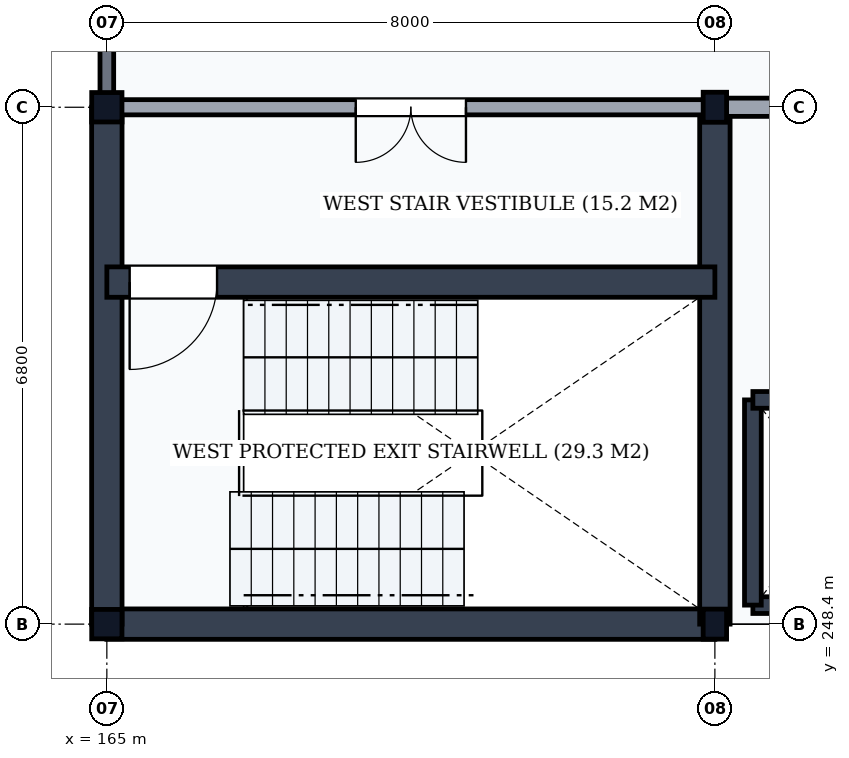
"""IFC4 building model, lengths in metres.
Left out: names, types, materials, properties, quantities, classifications, styles, units other than length and angle.
Written with IfcOpenShell. Run it as: python <this file> out.ifc"""

import sys

from ifc_helpers import new_model, si_unit, direction, frame, frame_2d, origin, origin_2d, place, context, subcontext, project, spatial, rectangle, i_section, extrude, element, fill, save


model = new_model("IFC4")
c1 = context("Model", 3, precision=1e-05, world=origin(), true_north=direction((0.0, 1.0)))
c2 = subcontext(c1, "Body", "Model", "MODEL_VIEW")
j1 = project(units=[si_unit("LENGTHUNIT", "METRE"), si_unit("PLANEANGLEUNIT", "RADIAN")], contexts=[c1])
p1 = place(None, origin())
s1 = spatial("IfcSite", under=j1, at=p1, CompositionType="ELEMENT")
p2 = place(p1, origin())
s2 = spatial("IfcBuilding", under=s1, at=p2, CompositionType="ELEMENT")
p3 = place(p2, frame((0.0, 0.0, 28.2)))
s3 = spatial("IfcBuildingStorey", under=s2, at=p3, CompositionType="ELEMENT", Elevation=28.2)
for number, where, z_axis, x_axis in (
    (1, (165.0, 248.4, 0.0), (0.0, 0.0, 1.0), (1.0, 0.0, 0.0)),
    (2, (165.0, 255.2, 0.0), (0.0, 0.0, 1.0), (1.0, 0.0, 0.0)),
):
    element("IfcColumn", number, at=place(p3, frame(where, z_axis=z_axis, x_axis=x_axis)), inside=s3, PredefinedType="COLUMN", context=c2, shape_type="SweptSolid", body=[
        extrude(i_section(OverallWidth=0.398, OverallDepth=0.387, WebThickness=0.021, FlangeThickness=0.033, FilletRadius=0.015, at=origin_2d()), origin(), (0.0, 0.0, 1.0), 3.9),
    ])
for number, where, z_axis, x_axis in (
    (3, (173.0, 248.4, 0.0), (0.0, 0.0, 1.0), (1.0, 0.0, 0.0)),
    (4, (173.0, 255.2, 0.0), (0.0, 0.0, 1.0), (1.0, 0.0, 0.0)),
):
    element("IfcColumn", number, at=place(p3, frame(where, z_axis=z_axis, x_axis=x_axis)), inside=s3, PredefinedType="COLUMN", context=c2, shape_type="SweptSolid", body=[
        extrude(i_section(OverallWidth=0.308, OverallDepth=0.395, WebThickness=0.021, FlangeThickness=0.04, FilletRadius=0.027, at=origin_2d()), origin(), (0.0, 0.0, 1.0), 3.9),
    ])
p4 = place(p3, frame((165.0, 255.206, 0.0), z_axis=(0.0, 0.0, 1.0), x_axis=(0.0, 1.0, 0.0)))
e5 = element("IfcWall", 5, at=p4, inside=s3, PredefinedType="SOLIDWALL", context=c2, shape_type="SweptSolid", body=[
    extrude(rectangle(XDim=7.588, YDim=0.18, at=frame_2d((3.794, 0.0))), origin(), (0.0, 0.0, 1.0), 3.388),
])
p5 = place(p3, frame((165.0, 248.4, 0.0), z_axis=(0.0, 0.0, 1.0), x_axis=(1.0, 0.0, 0.0)))
e6 = element("IfcWall", 6, at=p5, inside=s3, PredefinedType="SHEAR", context=c2, shape_type="SweptSolid", body=[
    extrude(rectangle(XDim=8.0, YDim=0.4, at=frame_2d((4.0, 0.0))), origin(), (0.0, 0.0, 1.0), 3.66),
])
for number, where, z_axis, x_axis in (
    (7, (165.0, 248.4, 0.0), (0.0, 0.0, 1.0), (0.0, 1.0, 0.0)),
    (8, (173.0, 248.4, 0.0), (0.0, 0.0, 1.0), (0.0, 1.0, 0.0)),
):
    element("IfcWall", number, at=place(p3, frame(where, z_axis=z_axis, x_axis=x_axis)), inside=s3, PredefinedType="SHEAR", context=c2, shape_type="SweptSolid", body=[
        extrude(rectangle(XDim=6.8, YDim=0.4, at=frame_2d((3.4, 0.0))), origin(), (0.0, 0.0, 1.0), 3.66),
    ])
p6 = place(p3, frame((165.0, 252.9, 0.0), z_axis=(0.0, 0.0, 1.0), x_axis=(1.0, 0.0, 0.0)))
e9 = element("IfcWall", 9, at=p6, inside=s3, PredefinedType="SHEAR", context=c2, shape_type="SweptSolid", body=[
    extrude(rectangle(XDim=8.0, YDim=0.4, at=frame_2d((4.0, 0.0))), origin(), (0.0, 0.0, 1.0), 3.66),
])
p7 = place(p6, frame((0.3, 0.0, 0.0)))
e10 = element("IfcOpeningElement", 10, at=p7, cuts=e9, PredefinedType="OPENING", context=c2, shape_type="SweptSolid", body=[
    extrude(rectangle(XDim=1.15, YDim=2.15, at=frame_2d((0.575, 1.075))), frame((0.0, 0.215, 0.0), z_axis=(0.0, -1.0, 0.0), x_axis=(1.0, 0.0, 0.0)), (0.0, 0.0, 1.0), 0.43),
])
p8 = place(p3, frame((165.0, 255.2, 0.0), z_axis=(0.0, 0.0, 1.0), x_axis=(1.0, 0.0, 0.0)))
e11 = element("IfcWall", 11, at=p8, inside=s3, PredefinedType="PARTITIONING", context=c2, shape_type="SweptSolid", body=[
    extrude(rectangle(XDim=8.0, YDim=0.2, at=frame_2d((4.0, 0.0))), origin(), (0.0, 0.0, 1.0), 3.058),
])
p9 = place(p8, frame((3.275, 0.0, 0.0)))
e12 = element("IfcOpeningElement", 12, at=p9, cuts=e11, PredefinedType="OPENING", context=c2, shape_type="SweptSolid", body=[
    extrude(rectangle(XDim=1.45, YDim=2.2, at=frame_2d((0.725, 1.1))), frame((0.0, 0.115, 0.0), z_axis=(0.0, -1.0, 0.0), x_axis=(1.0, 0.0, 0.0)), (0.0, 0.0, 1.0), 0.23),
])
p10 = place(p3, frame((173.5, 248.65, 0.0), z_axis=(0.0, 0.0, 1.0), x_axis=(1.0, 0.0, 0.0)))
e13 = element("IfcWall", 13, at=p10, inside=s3, PredefinedType="SHEAR", context=c2, shape_type="SweptSolid", body=[
    extrude(rectangle(XDim=2.2, YDim=0.22, at=frame_2d((1.1, 0.0))), origin(), (0.0, 0.0, 1.0), 3.66),
])
p11 = place(p3, frame((173.5, 248.65, 0.0), z_axis=(0.0, 0.0, 1.0), x_axis=(0.0, 1.0, 0.0)))
e14 = element("IfcWall", 14, at=p11, inside=s3, PredefinedType="SHEAR", context=c2, shape_type="SweptSolid", body=[
    extrude(rectangle(XDim=2.7, YDim=0.22, at=frame_2d((1.35, 0.0))), origin(), (0.0, 0.0, 1.0), 3.66),
])
p12 = place(p3, frame((173.5, 251.35, 0.0), z_axis=(0.0, 0.0, 1.0), x_axis=(1.0, 0.0, 0.0)))
e15 = element("IfcWall", 15, at=p12, inside=s3, PredefinedType="SHEAR", context=c2, shape_type="SweptSolid", body=[
    extrude(rectangle(XDim=2.2, YDim=0.22, at=frame_2d((1.1, 0.0))), origin(), (0.0, 0.0, 1.0), 3.66),
])
p13 = place(p12, frame((0.55, 0.0, 0.0)))
e16 = element("IfcOpeningElement", 16, at=p13, cuts=e15, PredefinedType="OPENING", context=c2, shape_type="SweptSolid", body=[
    extrude(rectangle(XDim=1.1, YDim=2.15, at=frame_2d((0.55, 1.075))), frame((0.0, 0.125, 0.0), z_axis=(0.0, -1.0, 0.0), x_axis=(1.0, 0.0, 0.0)), (0.0, 0.0, 1.0), 0.25),
])
p14 = place(p3, frame((173.0, 255.2, 0.0), z_axis=(0.0, 0.0, 1.0), x_axis=(1.0, 0.0, 0.0)))
e17 = element("IfcWall", 17, at=p14, inside=s3, PredefinedType="PARTITIONING", context=c2, shape_type="SweptSolid", body=[
    extrude(rectangle(XDim=8.0, YDim=0.24, at=frame_2d((4.0, 0.0))), origin(), (0.0, 0.0, 1.0), 3.058),
])
p15 = place(p14, frame((1.05, 0.0, 0.0)))
e18 = element("IfcOpeningElement", 18, at=p15, cuts=e17, PredefinedType="OPENING", context=c2, shape_type="SweptSolid", body=[
    extrude(rectangle(XDim=1.0, YDim=2.1, at=frame_2d((0.5, 1.05))), frame((0.0, 0.135, 0.0), z_axis=(0.0, -1.0, 0.0), x_axis=(1.0, 0.0, 0.0)), (0.0, 0.0, 1.0), 0.27),
])
p16 = place(p14, frame((4.6, 0.0, 0.0)))
e19 = element("IfcOpeningElement", 19, at=p16, cuts=e17, PredefinedType="OPENING", context=c2, shape_type="SweptSolid", body=[
    extrude(rectangle(XDim=1.6, YDim=2.25, at=frame_2d((0.8, 1.125))), frame((0.0, 0.135, 0.0), z_axis=(0.0, -1.0, 0.0), x_axis=(1.0, 0.0, 0.0)), (0.0, 0.0, 1.0), 0.27),
])
p17 = place(p7, frame((1.15, 0.0, 0.0), z_axis=(0.0, 0.0, 1.0), x_axis=(-1.0, 0.0, 0.0)))
e20 = element("IfcDoor", 20, at=p17, inside=s3, OperationType="SINGLE_SWING_RIGHT", PredefinedType="DOOR", context=c2, shape_type="SweptSolid", body=[
    extrude(rectangle(XDim=1.15, YDim=2.15, at=frame_2d((0.575, 1.075))), frame((0.0, 0.025, 0.0), z_axis=(0.0, -1.0, 0.0), x_axis=(1.0, 0.0, 0.0)), (0.0, 0.0, 1.0), 0.05),
])
fill(e10, e20)
p18 = place(p9, frame((1.45, 0.0, 0.0), z_axis=(0.0, 0.0, 1.0), x_axis=(-1.0, 0.0, 0.0)))
e21 = element("IfcDoor", 21, at=p18, inside=s3, OperationType="DOUBLE_DOOR_SINGLE_SWING", PredefinedType="DOOR", context=c2, shape_type="SweptSolid", body=[
    extrude(rectangle(XDim=1.45, YDim=2.2, at=frame_2d((0.725, 1.1))), frame((0.0, 0.025, 0.0), z_axis=(0.0, -1.0, 0.0), x_axis=(1.0, 0.0, 0.0)), (0.0, 0.0, 1.0), 0.05),
])
fill(e12, e21)
save(model, sys.argv[1])
